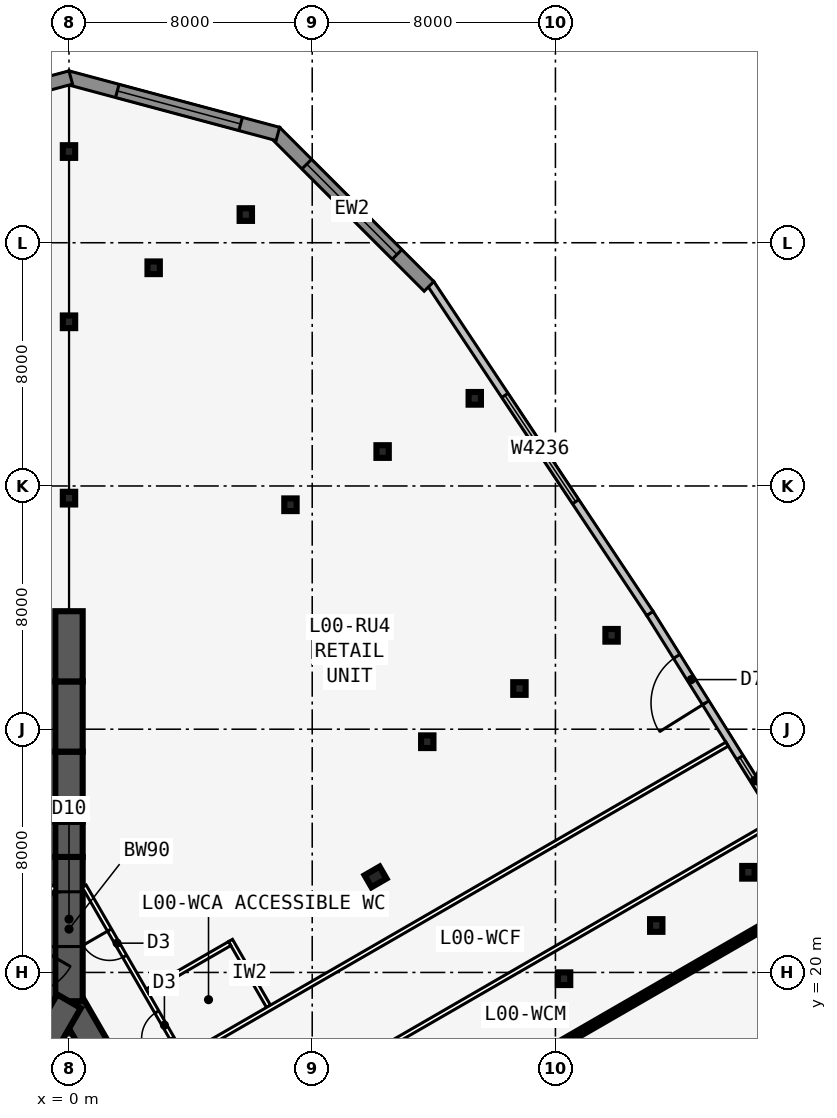
"""IFC4 building model, lengths in metres.
Left out: names, types, materials, properties, quantities, classifications, styles, units other than length and angle.
Written with IfcOpenShell. Run it as: python <this file> out.ifc"""

import sys

from ifc_helpers import new_model, si_unit, direction, frame, frame_2d, origin, origin_2d, place, context, subcontext, project, spatial, rectangle, i_section, extrude, element, fill, save


model = new_model("IFC4")
c1 = context("Model", 3, precision=1e-05, world=origin(), true_north=direction((0.0, 1.0)))
c2 = subcontext(c1, "Body", "Model", "MODEL_VIEW")
j1 = project(units=[si_unit("LENGTHUNIT", "METRE"), si_unit("PLANEANGLEUNIT", "RADIAN")], contexts=[c1])
p1 = place(None, origin())
s1 = spatial("IfcSite", under=j1, at=p1, CompositionType="ELEMENT")
p2 = place(p1, origin())
s2 = spatial("IfcBuilding", under=s1, at=p2, CompositionType="ELEMENT")
p3 = place(p2, origin())
s3 = spatial("IfcBuildingStorey", under=s2, at=p3, CompositionType="ELEMENT", Elevation=0.0)
p4 = place(p3, frame((16.5, -9.526, -0.3), z_axis=(0.0, 0.0, 1.0), x_axis=(-0.499999749417, 0.866025548458, 0.0)))
e1 = element("IfcWall", 1, at=p4, inside=s3, PredefinedType="SHEAR", context=c2, shape_type="SweptSolid", body=[
    extrude(rectangle(XDim=33.0, YDim=0.9, at=frame_2d((16.5, 0.0))), origin(), (0.0, 0.0, 1.0), 6.3),
])
p5 = place(p4, frame((14.15, 0.0, 0.3)))
e2 = element("IfcOpeningElement", 2, at=p5, cuts=e1, PredefinedType="OPENING", context=c2, shape_type="SweptSolid", body=[
    extrude(rectangle(XDim=1.8, YDim=2.13, at=frame_2d((0.9, 1.065))), frame((0.0, 0.46, 0.0), z_axis=(0.0, -1.0, 0.0), x_axis=(1.0, 0.0, 0.0)), (0.0, 0.0, 1.0), 0.92),
])
p6 = place(p4, frame((12.6, 0.0, 0.3)))
e3 = element("IfcOpeningElement", 3, at=p6, cuts=e1, PredefinedType="OPENING", context=c2, shape_type="SweptSolid", body=[
    extrude(rectangle(XDim=1.0, YDim=2.13, at=frame_2d((0.5, 1.065))), frame((0.0, 0.46, 0.0), z_axis=(0.0, -1.0, 0.0), x_axis=(1.0, 0.0, 0.0)), (0.0, 0.0, 1.0), 0.92),
])
p7 = place(p3, frame((0.0, 19.052, -0.3), z_axis=(0.0, 0.0, 1.0), x_axis=(-0.499999749417, -0.866025548458, 0.0)))
e4 = element("IfcWall", 4, at=p7, inside=s3, PredefinedType="SHEAR", context=c2, shape_type="SweptSolid", body=[
    extrude(rectangle(XDim=33.0, YDim=0.9, at=frame_2d((16.5, 0.0))), origin(), (0.0, 0.0, 1.0), 6.3),
])
p8 = place(p7, frame((14.15, 0.0, 0.3)))
e5 = element("IfcOpeningElement", 5, at=p8, cuts=e4, PredefinedType="OPENING", context=c2, shape_type="SweptSolid", body=[
    extrude(rectangle(XDim=1.8, YDim=2.13, at=frame_2d((0.9, 1.065))), frame((0.0, 0.46, 0.0), z_axis=(0.0, -1.0, 0.0), x_axis=(1.0, 0.0, 0.0)), (0.0, 0.0, 1.0), 0.92),
])
p9 = place(p7, frame((12.6, 0.0, 0.3)))
e6 = element("IfcOpeningElement", 6, at=p9, cuts=e4, PredefinedType="OPENING", context=c2, shape_type="SweptSolid", body=[
    extrude(rectangle(XDim=1.0, YDim=2.13, at=frame_2d((0.5, 1.065))), frame((0.0, 0.46, 0.0), z_axis=(0.0, -1.0, 0.0), x_axis=(1.0, 0.0, 0.0)), (0.0, 0.0, 1.0), 0.92),
])
p10 = place(p3, frame((0.0, 19.052, -0.3), z_axis=(0.0, 0.0, 1.0), x_axis=(0.0, 1.0, 0.0)))
e7 = element("IfcWall", 7, at=p10, inside=s3, PredefinedType="SHEAR", context=c2, shape_type="SweptSolid", body=[
    extrude(rectangle(XDim=4.746, YDim=0.9, at=frame_2d((2.373, 0.0))), origin(), (0.0, 0.0, 1.0), 6.3),
])
p11 = place(p10, frame((1.8, 0.0, 0.3)))
e8 = element("IfcOpeningElement", 8, at=p11, cuts=e7, PredefinedType="OPENING", context=c2, shape_type="SweptSolid", body=[
    extrude(rectangle(XDim=1.8, YDim=2.13, at=frame_2d((0.9, 1.065))), frame((0.0, 0.46, 0.0), z_axis=(0.0, -1.0, 0.0), x_axis=(1.0, 0.0, 0.0)), (0.0, 0.0, 1.0), 0.92),
])
p12 = place(p3, frame((0.0, 23.799, -0.3), z_axis=(0.0, 0.0, 1.0), x_axis=(0.0, 1.0, 0.0)))
e9 = element("IfcWall", 9, at=p12, inside=s3, PredefinedType="SHEAR", context=c2, shape_type="SweptSolid", body=[
    extrude(rectangle(XDim=1.155, YDim=0.9, at=frame_2d((0.577, 0.0))), origin(), (0.0, 0.0, 1.0), 6.3),
])
p13 = place(p3, frame((0.0, 24.953, -0.3), z_axis=(0.0, 0.0, 1.0), x_axis=(0.0, 1.0, 0.0)))
e10 = element("IfcWall", 10, at=p13, inside=s3, PredefinedType="SHEAR", context=c2, shape_type="SweptSolid", body=[
    extrude(rectangle(XDim=2.309, YDim=0.9, at=frame_2d((1.155, 0.0))), origin(), (0.0, 0.0, 1.0), 6.3),
])
p14 = place(p3, frame((0.0, 27.263, -0.3), z_axis=(0.0, 0.0, 1.0), x_axis=(0.0, 1.0, 0.0)))
e11 = element("IfcWall", 11, at=p14, inside=s3, PredefinedType="SHEAR", context=c2, shape_type="SweptSolid", body=[
    extrude(rectangle(XDim=2.31, YDim=0.9, at=frame_2d((1.155, 0.0))), origin(), (0.0, 0.0, 1.0), 6.3),
])
p15 = place(p3, frame((0.0, 29.572, -0.3), z_axis=(0.0, 0.0, 1.0), x_axis=(0.0, 1.0, 0.0)))
e12 = element("IfcWall", 12, at=p15, inside=s3, PredefinedType="SHEAR", context=c2, shape_type="SweptSolid", body=[
    extrude(rectangle(XDim=2.309, YDim=0.9, at=frame_2d((1.155, 0.0))), origin(), (0.0, 0.0, 1.0), 6.3),
])
p16 = place(p3, frame((10.083, 23.142, -0.3), z_axis=(0.0, 0.0, 1.0), x_axis=(-0.5, 0.866025403784, 0.0)))
e13 = element("IfcColumn", 13, at=p16, inside=s3, PredefinedType="COLUMN", context=c2, shape_type="SweptSolid", body=[
    extrude(i_section(OverallWidth=0.455, OverallDepth=0.569, WebThickness=0.078, FlangeThickness=0.125, at=origin_2d()), origin(), (0.0, 0.0, 1.0), 6.3),
])
for number, where, z_axis, x_axis in (
    (14, (0.0, 35.6, -0.3), (0.0, 0.0, 1.0), (1.0, 0.0, 0.0)),
    (15, (0.0, 41.4, -0.3), (0.0, 0.0, 1.0), (1.0, 0.0, 0.0)),
    (16, (0.0, 47.0, -0.3), (0.0, 0.0, 1.0), (1.0, 0.0, 0.0)),
    (17, (11.785, 27.588, -0.3), (0.0, 0.0, 1.0), (1.0, 0.0, 0.0)),
    (18, (7.285, 35.383, -0.3), (0.0, 0.0, 1.0), (1.0, 0.0, 0.0)),
    (19, (2.785, 43.177, -0.3), (0.0, 0.0, 1.0), (1.0, 0.0, 0.0)),
    (20, (16.285, 19.794, -0.3), (0.0, 0.0, 1.0), (1.0, 0.0, 0.0)),
    (21, (14.816, 29.338, -0.3), (0.0, 0.0, 1.0), (1.0, 0.0, 0.0)),
    (22, (10.316, 37.133, -0.3), (0.0, 0.0, 1.0), (1.0, 0.0, 0.0)),
    (23, (5.816, 44.927, -0.3), (0.0, 0.0, 1.0), (1.0, 0.0, 0.0)),
    (24, (19.316, 21.544, -0.3), (0.0, 0.0, 1.0), (1.0, 0.0, 0.0)),
    (25, (17.847, 31.088, -0.3), (0.0, 0.0, 1.0), (1.0, 0.0, 0.0)),
    (26, (13.347, 38.883, -0.3), (0.0, 0.0, 1.0), (1.0, 0.0, 0.0)),
    (27, (22.347, 23.294, -0.3), (0.0, 0.0, 1.0), (1.0, 0.0, 0.0)),
):
    element("IfcColumn", number, at=place(p3, frame(where, z_axis=z_axis, x_axis=x_axis)), inside=s3, PredefinedType="COLUMN", context=c2, shape_type="SweptSolid", body=[
        extrude(i_section(OverallWidth=0.406, OverallDepth=0.417, WebThickness=0.03, FlangeThickness=0.048, at=origin_2d()), origin(), (0.0, 0.0, 1.0), 6.3),
    ])
p17 = place(p3, frame((23.877, 24.173, -0.3), z_axis=(0.0, 0.0, 1.0), x_axis=(-0.529864906428, 0.848082060261, 0.0)))
e28 = element("IfcWall", 28, at=p17, inside=s3, PredefinedType="STANDARD", context=c2, shape_type="SweptSolid", body=[
    extrude(rectangle(XDim=9.006, YDim=0.25, at=frame_2d((4.503, 0.0))), origin(), (0.0, 0.0, 1.0), 6.05),
])
p18 = place(p17, frame((1.617, 0.0, 1.2)))
e29 = element("IfcOpeningElement", 29, at=p18, cuts=e28, PredefinedType="OPENING", context=c2, shape_type="SweptSolid", body=[
    extrude(rectangle(XDim=1.8, YDim=3.6, at=frame_2d((0.9, 1.8))), frame((0.0, 0.135, 0.0), z_axis=(0.0, -1.0, 0.0), x_axis=(1.0, 0.0, 0.0)), (0.0, 0.0, 1.0), 0.27),
])
p19 = place(p17, frame((5.537, 0.0, 0.3)))
e30 = element("IfcOpeningElement", 30, at=p19, cuts=e28, PredefinedType="OPENING", context=c2, shape_type="SweptSolid", body=[
    extrude(rectangle(XDim=1.8, YDim=2.7, at=frame_2d((0.9, 1.35))), frame((0.0, 0.135, 0.0), z_axis=(0.0, -1.0, 0.0), x_axis=(1.0, 0.0, 0.0)), (0.0, 0.0, 1.0), 0.27),
])
p20 = place(p3, frame((19.108, 31.807, -0.3), z_axis=(0.0, 0.0, 1.0), x_axis=(-0.553640063994, 0.832756074454, 0.0)))
e31 = element("IfcWall", 31, at=p20, inside=s3, PredefinedType="STANDARD", context=c2, shape_type="SweptSolid", body=[
    extrude(rectangle(XDim=13.026, YDim=0.25, at=frame_2d((6.513, 0.0))), origin(), (0.0, 0.0, 1.0), 6.05),
])
p21 = place(p20, frame((4.413, 0.0, 1.2)))
e32 = element("IfcOpeningElement", 32, at=p21, cuts=e31, PredefinedType="OPENING", context=c2, shape_type="SweptSolid", body=[
    extrude(rectangle(XDim=4.2, YDim=3.6, at=frame_2d((2.1, 1.8))), frame((0.0, 0.135, 0.0), z_axis=(0.0, -1.0, 0.0), x_axis=(1.0, 0.0, 0.0)), (0.0, 0.0, 1.0), 0.27),
])
p22 = place(p3, frame((11.841, 42.565, -0.3), z_axis=(0.0, 0.0, 1.0), x_axis=(-0.707089762358, 0.707123799605, 0.0)))
e33 = element("IfcWall", 33, at=p22, inside=s3, PredefinedType="SOLIDWALL", context=c2, shape_type="SweptSolid", body=[
    extrude(rectangle(XDim=7.173, YDim=0.45, at=frame_2d((3.586, 0.0))), origin(), (0.0, 0.0, 1.0), 6.05),
])
p23 = place(p22, frame((1.486, 0.0, 1.2)))
e34 = element("IfcOpeningElement", 34, at=p23, cuts=e33, PredefinedType="OPENING", context=c2, shape_type="SweptSolid", body=[
    extrude(rectangle(XDim=4.2, YDim=3.6, at=frame_2d((2.1, 1.8))), frame((0.0, 0.235, 0.0), z_axis=(0.0, -1.0, 0.0), x_axis=(1.0, 0.0, 0.0)), (0.0, 0.0, 1.0), 0.47),
])
p24 = place(p3, frame((6.87, 47.578, -0.3), z_axis=(0.0, 0.0, 1.0), x_axis=(-0.965924653531, 0.258823421857, 0.0)))
e35 = element("IfcWall", 35, at=p24, inside=s3, PredefinedType="SOLIDWALL", context=c2, shape_type="SweptSolid", body=[
    extrude(rectangle(XDim=7.173, YDim=0.45, at=frame_2d((3.586, 0.0))), origin(), (0.0, 0.0, 1.0), 6.05),
])
p25 = place(p24, frame((1.268, 0.0, 1.2)))
e36 = element("IfcOpeningElement", 36, at=p25, cuts=e35, PredefinedType="OPENING", context=c2, shape_type="SweptSolid", body=[
    extrude(rectangle(XDim=4.2, YDim=3.6, at=frame_2d((2.1, 1.8))), frame((0.0, 0.235, 0.0), z_axis=(0.0, -1.0, 0.0), x_axis=(1.0, 0.0, 0.0)), (0.0, 0.0, 1.0), 0.47),
])
p26 = place(p3, frame((0.058, 49.435, -0.3), z_axis=(0.0, 0.0, 1.0), x_axis=(-0.965924653531, -0.258823421857, 0.0)))
e37 = element("IfcWall", 37, at=p26, inside=s3, PredefinedType="SOLIDWALL", context=c2, shape_type="SweptSolid", body=[
    extrude(rectangle(XDim=7.173, YDim=0.45, at=frame_2d((3.586, 0.0))), origin(), (0.0, 0.0, 1.0), 6.05),
])
p27 = place(p26, frame((2.004, 0.0, 0.3)))
e38 = element("IfcOpeningElement", 38, at=p27, cuts=e37, PredefinedType="OPENING", context=c2, shape_type="SweptSolid", body=[
    extrude(rectangle(XDim=3.6, YDim=4.2, at=frame_2d((1.8, 2.1))), frame((0.0, 0.235, 0.0), z_axis=(0.0, -1.0, 0.0), x_axis=(1.0, 0.0, 0.0)), (0.0, 0.0, 1.0), 0.47),
])
p28 = place(p3, frame((20.027, -10.985, -0.3), z_axis=(0.0, 0.0, 1.0), x_axis=(-0.500001677587, 0.866024435227, 0.0)))
e39 = element("IfcWall", 39, at=p28, inside=s3, PredefinedType="PARTITIONING", context=c2, shape_type="SweptSolid", body=[
    extrude(rectangle(XDim=39.054, YDim=0.15, at=frame_2d((19.527, 0.0))), origin(), (0.0, 0.0, 1.0), 5.108),
])
p29 = place(p28, frame((8.427, 0.0, 0.3)))
e40 = element("IfcOpeningElement", 40, at=p29, cuts=e39, PredefinedType="OPENING", context=c2, shape_type="SweptSolid", body=[
    extrude(rectangle(XDim=1.8, YDim=2.13, at=frame_2d((0.9, 1.065))), frame((0.0, 0.085, 0.0), z_axis=(0.0, -1.0, 0.0), x_axis=(1.0, 0.0, 0.0)), (0.0, 0.0, 1.0), 0.17),
])
p30 = place(p28, frame((18.427, 0.0, 0.3)))
e41 = element("IfcOpeningElement", 41, at=p30, cuts=e39, PredefinedType="OPENING", context=c2, shape_type="SweptSolid", body=[
    extrude(rectangle(XDim=1.8, YDim=2.13, at=frame_2d((0.9, 1.065))), frame((0.0, 0.085, 0.0), z_axis=(0.0, -1.0, 0.0), x_axis=(1.0, 0.0, 0.0)), (0.0, 0.0, 1.0), 0.17),
])
p31 = place(p28, frame((23.227, 0.0, 0.3)))
e42 = element("IfcOpeningElement", 42, at=p31, cuts=e39, PredefinedType="OPENING", context=c2, shape_type="SweptSolid", body=[
    extrude(rectangle(XDim=1.8, YDim=2.13, at=frame_2d((0.9, 1.065))), frame((0.0, 0.085, 0.0), z_axis=(0.0, -1.0, 0.0), x_axis=(1.0, 0.0, 0.0)), (0.0, 0.0, 1.0), 0.17),
])
p32 = place(p28, frame((27.627, 0.0, 0.3)))
e43 = element("IfcOpeningElement", 43, at=p32, cuts=e39, PredefinedType="OPENING", context=c2, shape_type="SweptSolid", body=[
    extrude(rectangle(XDim=1.0, YDim=2.13, at=frame_2d((0.5, 1.065))), frame((0.0, 0.085, 0.0), z_axis=(0.0, -1.0, 0.0), x_axis=(1.0, 0.0, 0.0)), (0.0, 0.0, 1.0), 0.17),
])
p33 = place(p28, frame((30.527, 0.0, 0.3)))
e44 = element("IfcOpeningElement", 44, at=p33, cuts=e39, PredefinedType="OPENING", context=c2, shape_type="SweptSolid", body=[
    extrude(rectangle(XDim=1.0, YDim=2.13, at=frame_2d((0.5, 1.065))), frame((0.0, 0.085, 0.0), z_axis=(0.0, -1.0, 0.0), x_axis=(1.0, 0.0, 0.0)), (0.0, 0.0, 1.0), 0.17),
])
p34 = place(p28, frame((33.277, 0.0, 0.3)))
e45 = element("IfcOpeningElement", 45, at=p34, cuts=e39, PredefinedType="OPENING", context=c2, shape_type="SweptSolid", body=[
    extrude(rectangle(XDim=1.0, YDim=2.13, at=frame_2d((0.5, 1.065))), frame((0.0, 0.085, 0.0), z_axis=(0.0, -1.0, 0.0), x_axis=(1.0, 0.0, 0.0)), (0.0, 0.0, 1.0), 0.17),
])
p35 = place(p28, frame((36.39, 0.0, 0.3)))
e46 = element("IfcOpeningElement", 46, at=p35, cuts=e39, PredefinedType="OPENING", context=c2, shape_type="SweptSolid", body=[
    extrude(rectangle(XDim=1.0, YDim=2.13, at=frame_2d((0.5, 1.065))), frame((0.0, 0.085, 0.0), z_axis=(0.0, -1.0, 0.0), x_axis=(1.0, 0.0, 0.0)), (0.0, 0.0, 1.0), 0.17),
])
p36 = place(p3, frame((9.329, 7.695, -0.3), z_axis=(0.0, 0.0, 1.0), x_axis=(0.866025850686, 0.499999225942, 0.0)))
e47 = element("IfcWall", 47, at=p36, inside=s3, PredefinedType="SHEAR", context=c2, shape_type="SweptSolid", body=[
    extrude(rectangle(XDim=20.794, YDim=0.2, at=frame_2d((10.397, 0.0))), origin(), (0.0, 0.0, 1.0), 6.3),
])
p37 = place(p3, frame((6.729, 12.198, -0.3), z_axis=(0.0, 0.0, 1.0), x_axis=(0.866025976348, 0.499999008289, 0.0)))
e48 = element("IfcWall", 48, at=p37, inside=s3, PredefinedType="SHEAR", context=c2, shape_type="SweptSolid", body=[
    extrude(rectangle(XDim=20.734, YDim=0.2, at=frame_2d((10.367, 0.0))), origin(), (0.0, 0.0, 1.0), 6.3),
])
p38 = place(p3, frame((5.329, 14.623, -0.3), z_axis=(0.0, 0.0, 1.0), x_axis=(0.866021414031, 0.500006910393, 0.0)))
e49 = element("IfcWall", 49, at=p38, inside=s3, PredefinedType="PARTITIONING", context=c2, shape_type="SweptSolid", body=[
    extrude(rectangle(XDim=20.678, YDim=0.15, at=frame_2d((10.339, 0.0))), origin(), (0.0, 0.0, 1.0), 5.108),
])
p39 = place(p3, frame((3.829, 17.221, -0.3), z_axis=(0.0, 0.0, 1.0), x_axis=(0.866020381737, 0.50000869834, 0.0)))
e50 = element("IfcWall", 50, at=p39, inside=s3, PredefinedType="PARTITIONING", context=c2, shape_type="SweptSolid", body=[
    extrude(rectangle(XDim=20.574, YDim=0.15, at=frame_2d((10.287, 0.0))), origin(), (0.0, 0.0, 1.0), 6.05),
])
p40 = place(p3, frame((6.562, 18.886, -0.3), z_axis=(0.0, 0.0, 1.0), x_axis=(-0.500004234368, 0.866022959057, 0.0)))
e51 = element("IfcWall", 51, at=p40, inside=s3, PredefinedType="PARTITIONING", context=c2, shape_type="SweptSolid", body=[
    extrude(rectangle(XDim=2.5, YDim=0.15, at=frame_2d((1.25, 0.0))), origin(), (0.0, 0.0, 1.0), 6.05),
])
p41 = place(p3, frame((2.579, 19.386, -0.3), z_axis=(0.0, 0.0, 1.0), x_axis=(0.866022959057, 0.500004234368, 0.0)))
e52 = element("IfcWall", 52, at=p41, inside=s3, PredefinedType="PARTITIONING", context=c2, shape_type="SweptSolid", body=[
    extrude(rectangle(XDim=3.125, YDim=0.15, at=frame_2d((1.562, 0.0))), origin(), (0.0, 0.0, 1.0), 6.05),
])
p42 = place(p3, frame((-0.5, 22.836, -0.3), z_axis=(0.0, 0.0, 1.0), x_axis=(-0.500001677587, -0.866024435227, 0.0)))
e53 = element("IfcWall", 53, at=p42, inside=s3, PredefinedType="PARTITIONING", context=c2, shape_type="SweptSolid", body=[
    extrude(rectangle(XDim=39.054, YDim=0.15, at=frame_2d((19.527, 0.0))), origin(), (0.0, 0.0, 1.0), 5.108),
])
p43 = place(p42, frame((2.013, 0.0, 0.3)))
e54 = element("IfcOpeningElement", 54, at=p43, cuts=e53, PredefinedType="OPENING", context=c2, shape_type="SweptSolid", body=[
    extrude(rectangle(XDim=1.8, YDim=2.13, at=frame_2d((0.9, 1.065))), frame((0.0, 0.085, 0.0), z_axis=(0.0, -1.0, 0.0), x_axis=(1.0, 0.0, 0.0)), (0.0, 0.0, 1.0), 0.17),
])
p44 = place(p42, frame((10.427, 0.0, 0.3)))
e55 = element("IfcOpeningElement", 55, at=p44, cuts=e53, PredefinedType="OPENING", context=c2, shape_type="SweptSolid", body=[
    extrude(rectangle(XDim=1.8, YDim=2.13, at=frame_2d((0.9, 1.065))), frame((0.0, 0.085, 0.0), z_axis=(0.0, -1.0, 0.0), x_axis=(1.0, 0.0, 0.0)), (0.0, 0.0, 1.0), 0.17),
])
p45 = place(p42, frame((18.427, 0.0, 0.3)))
e56 = element("IfcOpeningElement", 56, at=p45, cuts=e53, PredefinedType="OPENING", context=c2, shape_type="SweptSolid", body=[
    extrude(rectangle(XDim=1.8, YDim=2.13, at=frame_2d((0.9, 1.065))), frame((0.0, 0.085, 0.0), z_axis=(0.0, -1.0, 0.0), x_axis=(1.0, 0.0, 0.0)), (0.0, 0.0, 1.0), 0.17),
])
p46 = place(p42, frame((23.227, 0.0, 0.3)))
e57 = element("IfcOpeningElement", 57, at=p46, cuts=e53, PredefinedType="OPENING", context=c2, shape_type="SweptSolid", body=[
    extrude(rectangle(XDim=1.8, YDim=2.13, at=frame_2d((0.9, 1.065))), frame((0.0, 0.085, 0.0), z_axis=(0.0, -1.0, 0.0), x_axis=(1.0, 0.0, 0.0)), (0.0, 0.0, 1.0), 0.17),
])
p47 = place(p42, frame((27.627, 0.0, 0.3)))
e58 = element("IfcOpeningElement", 58, at=p47, cuts=e53, PredefinedType="OPENING", context=c2, shape_type="SweptSolid", body=[
    extrude(rectangle(XDim=1.0, YDim=2.13, at=frame_2d((0.5, 1.065))), frame((0.0, 0.085, 0.0), z_axis=(0.0, -1.0, 0.0), x_axis=(1.0, 0.0, 0.0)), (0.0, 0.0, 1.0), 0.17),
])
p48 = place(p42, frame((30.277, 0.0, 0.3)))
e59 = element("IfcOpeningElement", 59, at=p48, cuts=e53, PredefinedType="OPENING", context=c2, shape_type="SweptSolid", body=[
    extrude(rectangle(XDim=1.0, YDim=2.13, at=frame_2d((0.5, 1.065))), frame((0.0, 0.085, 0.0), z_axis=(0.0, -1.0, 0.0), x_axis=(1.0, 0.0, 0.0)), (0.0, 0.0, 1.0), 0.17),
])
p49 = place(p42, frame((34.89, 0.0, 0.3)))
e60 = element("IfcOpeningElement", 60, at=p49, cuts=e53, PredefinedType="OPENING", context=c2, shape_type="SweptSolid", body=[
    extrude(rectangle(XDim=1.0, YDim=2.13, at=frame_2d((0.5, 1.065))), frame((0.0, 0.085, 0.0), z_axis=(0.0, -1.0, 0.0), x_axis=(1.0, 0.0, 0.0)), (0.0, 0.0, 1.0), 0.17),
])
p50 = place(p18, origin())
e61 = element("IfcWindow", 61, at=p50, inside=s3, PartitioningType="SINGLE_PANEL", PredefinedType="WINDOW", context=c2, shape_type="SweptSolid", body=[
    extrude(rectangle(XDim=1.8, YDim=3.6, at=frame_2d((0.9, 1.8))), frame((0.0, 0.03, 0.0), z_axis=(0.0, -1.0, 0.0), x_axis=(1.0, 0.0, 0.0)), (0.0, 0.0, 1.0), 0.06),
])
fill(e29, e61)
p51 = place(p19, origin())
e62 = element("IfcDoor", 62, at=p51, inside=s3, OperationType="DOUBLE_DOOR_SINGLE_SWING", PredefinedType="DOOR", context=c2, shape_type="SweptSolid", body=[
    extrude(rectangle(XDim=1.8, YDim=2.7, at=frame_2d((0.9, 1.35))), frame((0.0, 0.025, 0.0), z_axis=(0.0, -1.0, 0.0), x_axis=(1.0, 0.0, 0.0)), (0.0, 0.0, 1.0), 0.05),
])
fill(e30, e62)
p52 = place(p21, origin())
e63 = element("IfcWindow", 63, at=p52, inside=s3, PartitioningType="SINGLE_PANEL", PredefinedType="WINDOW", context=c2, shape_type="SweptSolid", body=[
    extrude(rectangle(XDim=4.2, YDim=3.6, at=frame_2d((2.1, 1.8))), frame((0.0, 0.03, 0.0), z_axis=(0.0, -1.0, 0.0), x_axis=(1.0, 0.0, 0.0)), (0.0, 0.0, 1.0), 0.06),
])
fill(e32, e63)
p53 = place(p23, origin())
e64 = element("IfcWindow", 64, at=p53, inside=s3, PartitioningType="SINGLE_PANEL", PredefinedType="WINDOW", context=c2, shape_type="SweptSolid", body=[
    extrude(rectangle(XDim=4.2, YDim=3.6, at=frame_2d((2.1, 1.8))), frame((0.0, 0.03, 0.0), z_axis=(0.0, -1.0, 0.0), x_axis=(1.0, 0.0, 0.0)), (0.0, 0.0, 1.0), 0.06),
])
fill(e34, e64)
p54 = place(p25, origin())
e65 = element("IfcWindow", 65, at=p54, inside=s3, PartitioningType="SINGLE_PANEL", PredefinedType="WINDOW", context=c2, shape_type="SweptSolid", body=[
    extrude(rectangle(XDim=4.2, YDim=3.6, at=frame_2d((2.1, 1.8))), frame((0.0, 0.03, 0.0), z_axis=(0.0, -1.0, 0.0), x_axis=(1.0, 0.0, 0.0)), (0.0, 0.0, 1.0), 0.06),
])
fill(e36, e65)
p55 = place(p34, origin())
e66 = element("IfcDoor", 66, at=p55, inside=s3, OperationType="SINGLE_SWING_LEFT", PredefinedType="DOOR", context=c2, shape_type="SweptSolid", body=[
    extrude(rectangle(XDim=1.0, YDim=2.13, at=frame_2d((0.5, 1.065))), frame((0.0, 0.025, 0.0), z_axis=(0.0, -1.0, 0.0), x_axis=(1.0, 0.0, 0.0)), (0.0, 0.0, 1.0), 0.05),
])
fill(e45, e66)
p56 = place(p35, origin())
e67 = element("IfcDoor", 67, at=p56, inside=s3, OperationType="SINGLE_SWING_RIGHT", PredefinedType="DOOR", context=c2, shape_type="SweptSolid", body=[
    extrude(rectangle(XDim=1.0, YDim=2.13, at=frame_2d((0.5, 1.065))), frame((0.0, 0.025, 0.0), z_axis=(0.0, -1.0, 0.0), x_axis=(1.0, 0.0, 0.0)), (0.0, 0.0, 1.0), 0.05),
])
fill(e46, e67)
p57 = place(p11, origin())
e68 = element("IfcDoor", 68, at=p57, inside=s3, OperationType="DOUBLE_DOOR_DOUBLE_SWING", PredefinedType="DOOR", context=c2, shape_type="SweptSolid", body=[
    extrude(rectangle(XDim=1.8, YDim=2.13, at=frame_2d((0.9, 1.065))), frame((0.0, 0.025, 0.0), z_axis=(0.0, -1.0, 0.0), x_axis=(1.0, 0.0, 0.0)), (0.0, 0.0, 1.0), 0.05),
])
fill(e8, e68)
save(model, sys.argv[1])
